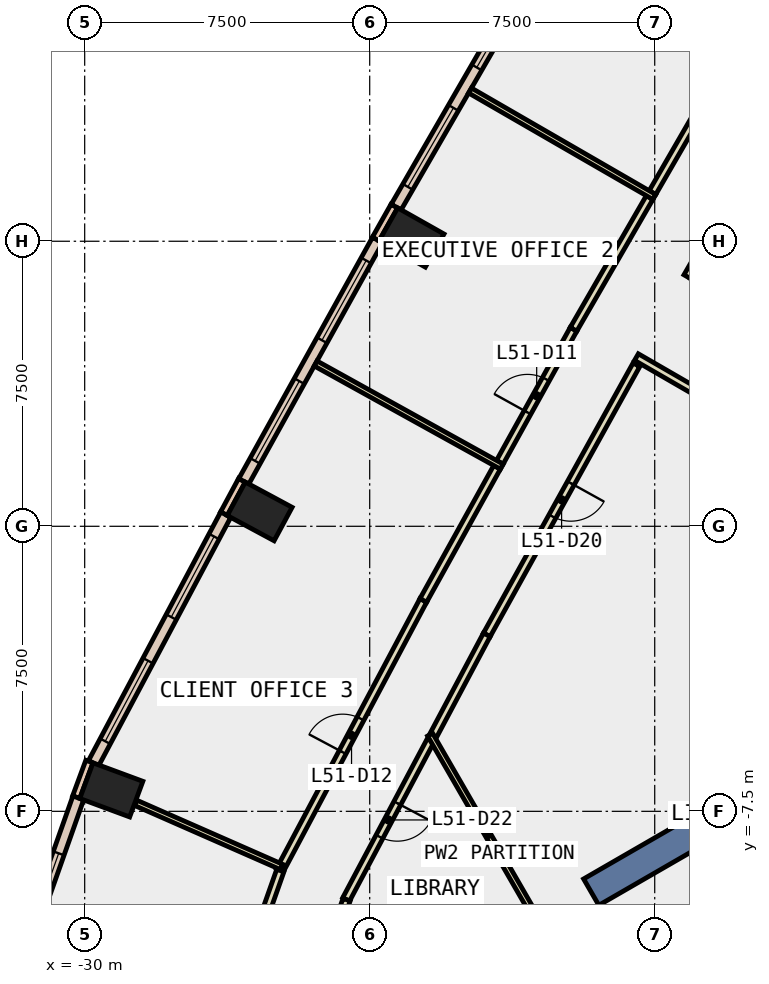
"""IFC4 building model, lengths in metres.
Left out: names, types, materials, properties, quantities, classifications, styles, units other than length and angle.
Written with IfcOpenShell. Run it as: python <this file> out.ifc"""

import sys

from ifc_helpers import new_model, si_unit, direction, frame, frame_2d, origin, origin_2d, place, context, subcontext, project, spatial, rectangle, extrude, element, fill, save


model = new_model("IFC4")
c1 = context("Model", 3, precision=1e-05, world=origin(), true_north=direction((0.0, 1.0)))
c2 = subcontext(c1, "Body", "Model", "MODEL_VIEW")
j1 = project(units=[si_unit("LENGTHUNIT", "METRE"), si_unit("PLANEANGLEUNIT", "RADIAN")], contexts=[c1])
p1 = place(None, origin())
s1 = spatial("IfcSite", under=j1, at=p1, CompositionType="ELEMENT")
p2 = place(p1, origin())
s2 = spatial("IfcBuilding", under=s1, at=p2, CompositionType="ELEMENT")
p3 = place(p2, frame((0.0, 0.0, 227.6)))
s3 = spatial("IfcBuildingStorey", under=s2, at=p3, CompositionType="ELEMENT", Elevation=227.6)
for number, where, z_axis, x_axis in (
    (1, (-21.4, 7.599, -0.4), (0.0, 0.0, 1.0), (0.491, 0.871, 0.0)),
    (2, (-25.395, 0.391, -0.4), (0.0, 0.0, 1.0), (0.474, 0.88, 0.0)),
    (3, (-29.299, -6.936, -0.4), (0.0, 0.0, 1.0), (0.347, 0.938, 0.0)),
):
    element("IfcColumn", number, at=place(p3, frame(where, z_axis=z_axis, x_axis=x_axis)), inside=s3, PredefinedType="COLUMN", context=c2, shape_type="SweptSolid", body=[
        extrude(rectangle(XDim=1.0, YDim=1.4, at=origin_2d()), origin(), (0.0, 0.0, 1.0), 4.2),
    ])
p4 = place(p3, frame((-8.877, -5.125, -0.4), z_axis=(0.0, 0.0, 1.0), x_axis=(-0.866017533419, -0.500013631625, 0.0)))
e4 = element("IfcWall", 4, at=p4, inside=s3, PredefinedType="SHEAR", context=c2, shape_type="SweptSolid", body=[
    extrude(rectangle(XDim=9.0, YDim=0.8, at=frame_2d((4.5, 0.0))), origin(), (0.0, 0.0, 1.0), 4.2),
])
p5 = place(p3, frame((-21.851, 8.427, 0.0), z_axis=(0.0, 0.0, 1.0), x_axis=(-0.491743606947, -0.87074004446, 0.0)))
e5 = element("IfcWall", 5, at=p5, inside=s3, PredefinedType="STANDARD", context=c2, shape_type="SweptSolid", body=[
    extrude(rectangle(XDim=1.0, YDim=0.2, at=frame_2d((0.5, 0.0))), origin(), (0.0, 0.0, 1.0), 3.8),
])
p6 = place(p3, frame((-25.862, 1.211, 0.0), z_axis=(0.0, 0.0, 1.0), x_axis=(-0.473765014438, -0.880651299377, 0.0)))
e6 = element("IfcWall", 6, at=p6, inside=s3, PredefinedType="STANDARD", context=c2, shape_type="SweptSolid", body=[
    extrude(rectangle(XDim=1.0, YDim=0.2, at=frame_2d((0.5, 0.0))), origin(), (0.0, 0.0, 1.0), 3.8),
])
p7 = place(p3, frame((-29.876, -6.19, 0.0), z_axis=(0.0, 0.0, 1.0), x_axis=(-0.346892928577, -0.937904737222, 0.0)))
e7 = element("IfcWall", 7, at=p7, inside=s3, PredefinedType="STANDARD", context=c2, shape_type="SweptSolid", body=[
    extrude(rectangle(XDim=1.0, YDim=0.2, at=frame_2d((0.5, 0.0))), origin(), (0.0, 0.0, 1.0), 3.8),
])
p8 = place(p3, frame((-18.175, 14.683, 0.0), z_axis=(0.0, 0.0, 1.0), x_axis=(-0.500075798504, -0.865981637075, 0.0)))
e8 = element("IfcWall", 8, at=p8, inside=s3, PredefinedType="STANDARD", context=c2, shape_type="SweptSolid", body=[
    extrude(rectangle(XDim=7.257, YDim=0.3, at=frame_2d((3.628, 0.0))), origin(), (0.0, 0.0, 1.0), 3.8),
])
p9 = place(p8, frame((0.614, 0.0, 0.9)))
e9 = element("IfcOpeningElement", 9, at=p9, cuts=e8, PredefinedType="OPENING", context=c2, shape_type="SweptSolid", body=[
    extrude(rectangle(XDim=2.4, YDim=2.6, at=frame_2d((1.2, 1.3))), frame((0.0, 0.16, 0.0), z_axis=(0.0, -1.0, 0.0), x_axis=(1.0, 0.0, 0.0)), (0.0, 0.0, 1.0), 0.32),
])
p10 = place(p8, frame((4.242, 0.0, 0.9)))
e10 = element("IfcOpeningElement", 10, at=p10, cuts=e8, PredefinedType="OPENING", context=c2, shape_type="SweptSolid", body=[
    extrude(rectangle(XDim=2.4, YDim=2.6, at=frame_2d((1.2, 1.3))), frame((0.0, 0.16, 0.0), z_axis=(0.0, -1.0, 0.0), x_axis=(1.0, 0.0, 0.0)), (0.0, 0.0, 1.0), 0.32),
])
p11 = place(p3, frame((-22.295, 7.531, 0.0), z_axis=(0.0, 0.0, 1.0), x_axis=(-0.484742980126, -0.874656643043, 0.0)))
e11 = element("IfcWall", 11, at=p11, inside=s3, PredefinedType="STANDARD", context=c2, shape_type="SweptSolid", body=[
    extrude(rectangle(XDim=7.258, YDim=0.3, at=frame_2d((3.629, 0.0))), origin(), (0.0, 0.0, 1.0), 3.8),
])
p12 = place(p11, frame((0.614, 0.0, 0.9)))
e12 = element("IfcOpeningElement", 12, at=p12, cuts=e11, PredefinedType="OPENING", context=c2, shape_type="SweptSolid", body=[
    extrude(rectangle(XDim=2.4, YDim=2.6, at=frame_2d((1.2, 1.3))), frame((0.0, 0.16, 0.0), z_axis=(0.0, -1.0, 0.0), x_axis=(1.0, 0.0, 0.0)), (0.0, 0.0, 1.0), 0.32),
])
p13 = place(p11, frame((4.243, 0.0, 0.9)))
e13 = element("IfcOpeningElement", 13, at=p13, cuts=e11, PredefinedType="OPENING", context=c2, shape_type="SweptSolid", body=[
    extrude(rectangle(XDim=2.4, YDim=2.6, at=frame_2d((1.2, 1.3))), frame((0.0, 0.16, 0.0), z_axis=(0.0, -1.0, 0.0), x_axis=(1.0, 0.0, 0.0)), (0.0, 0.0, 1.0), 0.32),
])
p14 = place(p3, frame((-26.289, 0.306, 0.0), z_axis=(0.0, 0.0, 1.0), x_axis=(-0.469429229062, -0.882970100797, 0.0)))
e14 = element("IfcWall", 14, at=p14, inside=s3, PredefinedType="STANDARD", context=c2, shape_type="SweptSolid", body=[
    extrude(rectangle(XDim=7.404, YDim=0.3, at=frame_2d((3.702, 0.0))), origin(), (0.0, 0.0, 1.0), 3.8),
])
p15 = place(p14, frame((0.651, 0.0, 0.9)))
e15 = element("IfcOpeningElement", 15, at=p15, cuts=e14, PredefinedType="OPENING", context=c2, shape_type="SweptSolid", body=[
    extrude(rectangle(XDim=2.4, YDim=2.6, at=frame_2d((1.2, 1.3))), frame((0.0, 0.16, 0.0), z_axis=(0.0, -1.0, 0.0), x_axis=(1.0, 0.0, 0.0)), (0.0, 0.0, 1.0), 0.32),
])
p16 = place(p14, frame((4.353, 0.0, 0.9)))
e16 = element("IfcOpeningElement", 16, at=p16, cuts=e14, PredefinedType="OPENING", context=c2, shape_type="SweptSolid", body=[
    extrude(rectangle(XDim=2.4, YDim=2.6, at=frame_2d((1.2, 1.3))), frame((0.0, 0.16, 0.0), z_axis=(0.0, -1.0, 0.0), x_axis=(1.0, 0.0, 0.0)), (0.0, 0.0, 1.0), 0.32),
])
p17 = place(p3, frame((-30.169, -7.147, 0.0), z_axis=(0.0, 0.0, 1.0), x_axis=(-0.333280640478, -0.942827669663, 0.0)))
e17 = element("IfcWall", 17, at=p17, inside=s3, PredefinedType="STANDARD", context=c2, shape_type="SweptSolid", body=[
    extrude(rectangle(XDim=4.492, YDim=0.3, at=frame_2d((2.246, 0.0))), origin(), (0.0, 0.0, 1.0), 3.8),
])
p18 = place(p17, frame((1.546, 0.0, 0.9)))
e18 = element("IfcOpeningElement", 18, at=p18, cuts=e17, PredefinedType="OPENING", context=c2, shape_type="SweptSolid", body=[
    extrude(rectangle(XDim=1.4, YDim=2.6, at=frame_2d((0.7, 1.3))), frame((0.0, 0.16, 0.0), z_axis=(0.0, -1.0, 0.0), x_axis=(1.0, 0.0, 0.0)), (0.0, 0.0, 1.0), 0.32),
])
p19 = place(p3, frame((-11.42, 11.283, 0.0), z_axis=(0.0, 0.0, 1.0), x_axis=(-0.500179011873, -0.86592202656, 0.0)))
e19 = element("IfcWall", 19, at=p19, inside=s3, PredefinedType="PARTITIONING", context=c2, shape_type="SweptSolid", body=[
    extrude(rectangle(XDim=5.446, YDim=0.2, at=frame_2d((2.723, 0.0))), origin(), (0.0, 0.0, 1.0), 3.8),
])
p20 = place(p19, frame((2.223, 0.0, 0.0)))
e20 = element("IfcOpeningElement", 20, at=p20, cuts=e19, PredefinedType="OPENING", context=c2, shape_type="SweptSolid", body=[
    extrude(rectangle(XDim=1.0, YDim=2.1, at=frame_2d((0.5, 1.05))), frame((0.0, 0.11, 0.0), z_axis=(0.0, -1.0, 0.0), x_axis=(1.0, 0.0, 0.0)), (0.0, 0.0, 1.0), 0.22),
])
p21 = place(p3, frame((-15.482, 4.249, 0.0), z_axis=(0.0, 0.0, 1.0), x_axis=(-0.484683114876, -0.874689818252, 0.0)))
e21 = element("IfcWall", 21, at=p21, inside=s3, PredefinedType="PARTITIONING", context=c2, shape_type="SweptSolid", body=[
    extrude(rectangle(XDim=8.123, YDim=0.2, at=frame_2d((4.062, 0.0))), origin(), (0.0, 0.0, 1.0), 3.8),
])
p22 = place(p21, frame((3.561, 0.0, 0.0)))
e22 = element("IfcOpeningElement", 22, at=p22, cuts=e21, PredefinedType="OPENING", context=c2, shape_type="SweptSolid", body=[
    extrude(rectangle(XDim=1.0, YDim=2.1, at=frame_2d((0.5, 1.05))), frame((0.0, 0.11, 0.0), z_axis=(0.0, -1.0, 0.0), x_axis=(1.0, 0.0, 0.0)), (0.0, 0.0, 1.0), 0.22),
])
p23 = place(p3, frame((-19.419, -2.856, 0.0), z_axis=(0.0, 0.0, 1.0), x_axis=(-0.469627838973, -0.882864481595, 0.0)))
e23 = element("IfcWall", 23, at=p23, inside=s3, PredefinedType="PARTITIONING", context=c2, shape_type="SweptSolid", body=[
    extrude(rectangle(XDim=2.996, YDim=0.2, at=frame_2d((1.498, 0.0))), origin(), (0.0, 0.0, 1.0), 3.8),
])
p24 = place(p3, frame((-20.896, -5.634, 0.0), z_axis=(0.0, 0.0, 1.0), x_axis=(-0.469448951755, -0.882959614986, 0.0)))
e24 = element("IfcWall", 24, at=p24, inside=s3, PredefinedType="PARTITIONING", context=c2, shape_type="SweptSolid", body=[
    extrude(rectangle(XDim=4.74, YDim=0.2, at=frame_2d((2.37, 0.0))), origin(), (0.0, 0.0, 1.0), 3.8),
])
p25 = place(p24, frame((1.87, 0.0, 0.0)))
e25 = element("IfcOpeningElement", 25, at=p25, cuts=e24, PredefinedType="OPENING", context=c2, shape_type="SweptSolid", body=[
    extrude(rectangle(XDim=1.0, YDim=2.1, at=frame_2d((0.5, 1.05))), frame((0.0, 0.11, 0.0), z_axis=(0.0, -1.0, 0.0), x_axis=(1.0, 0.0, 0.0)), (0.0, 0.0, 1.0), 0.22),
])
p26 = place(p3, frame((-23.108, -9.825, 0.0), z_axis=(0.0, 0.0, 1.0), x_axis=(-0.333166995935, -0.942867834227, 0.0)))
e26 = element("IfcWall", 26, at=p26, inside=s3, PredefinedType="PARTITIONING", context=c2, shape_type="SweptSolid", body=[
    extrude(rectangle(XDim=2.798, YDim=0.2, at=frame_2d((1.399, 0.0))), origin(), (0.0, 0.0, 1.0), 3.8),
])
p27 = place(p3, frame((-15.059, 8.78, 0.0), z_axis=(0.0, 0.0, 1.0), x_axis=(0.500093699572, 0.865971299552, 0.0)))
e27 = element("IfcWall", 27, at=p27, inside=s3, PredefinedType="PARTITIONING", context=c2, shape_type="SweptSolid", body=[
    extrude(rectangle(XDim=4.004, YDim=0.2, at=frame_2d((2.002, 0.0))), origin(), (0.0, 0.0, 1.0), 3.8),
])
p28 = place(p3, frame((-19.076, 1.684, 0.0), z_axis=(0.0, 0.0, 1.0), x_axis=(0.484679349661, 0.874691904623, 0.0)))
e28 = element("IfcWall", 28, at=p28, inside=s3, PredefinedType="PARTITIONING", context=c2, shape_type="SweptSolid", body=[
    extrude(rectangle(XDim=4.002, YDim=0.2, at=frame_2d((2.001, 0.0))), origin(), (0.0, 0.0, 1.0), 3.8),
])
p29 = place(p28, frame((1.501, 0.0, 0.0)))
e29 = element("IfcOpeningElement", 29, at=p29, cuts=e28, PredefinedType="OPENING", context=c2, shape_type="SweptSolid", body=[
    extrude(rectangle(XDim=1.0, YDim=2.1, at=frame_2d((0.5, 1.05))), frame((0.0, 0.11, 0.0), z_axis=(0.0, -1.0, 0.0), x_axis=(1.0, 0.0, 0.0)), (0.0, 0.0, 1.0), 0.22),
])
p30 = place(p3, frame((-17.136, 5.185, 0.0), z_axis=(0.0, 0.0, 1.0), x_axis=(0.500102734445, 0.865966081899, 0.0)))
e30 = element("IfcWall", 30, at=p30, inside=s3, PredefinedType="PARTITIONING", context=c2, shape_type="SweptSolid", body=[
    extrude(rectangle(XDim=4.001, YDim=0.2, at=frame_2d((2.0, 0.0))), origin(), (0.0, 0.0, 1.0), 3.8),
])
p31 = place(p3, frame((-24.866, -9.053, 0.0), z_axis=(0.0, 0.0, 1.0), x_axis=(0.469431794586, 0.882968736837, 0.0)))
e31 = element("IfcWall", 31, at=p31, inside=s3, PredefinedType="PARTITIONING", context=c2, shape_type="SweptSolid", body=[
    extrude(rectangle(XDim=8.046, YDim=0.2, at=frame_2d((4.023, 0.0))), origin(), (0.0, 0.0, 1.0), 3.8),
])
p32 = place(p31, frame((3.522, 0.0, 0.0)))
e32 = element("IfcOpeningElement", 32, at=p32, cuts=e31, PredefinedType="OPENING", context=c2, shape_type="SweptSolid", body=[
    extrude(rectangle(XDim=1.0, YDim=2.1, at=frame_2d((0.5, 1.05))), frame((0.0, 0.11, 0.0), z_axis=(0.0, -1.0, 0.0), x_axis=(1.0, 0.0, 0.0)), (0.0, 0.0, 1.0), 0.22),
])
p33 = place(p3, frame((-21.089, -1.949, 0.0), z_axis=(0.0, 0.0, 1.0), x_axis=(0.484622593188, 0.874723351793, 0.0)))
e33 = element("IfcWall", 33, at=p33, inside=s3, PredefinedType="PARTITIONING", context=c2, shape_type="SweptSolid", body=[
    extrude(rectangle(XDim=4.003, YDim=0.2, at=frame_2d((2.002, 0.0))), origin(), (0.0, 0.0, 1.0), 3.8),
])
p34 = place(p3, frame((-26.013, -12.345, 0.0), z_axis=(0.0, 0.0, 1.0), x_axis=(0.333116923704, 0.942885526001, 0.0)))
e34 = element("IfcWall", 34, at=p34, inside=s3, PredefinedType="PARTITIONING", context=c2, shape_type="SweptSolid", body=[
    extrude(rectangle(XDim=3.485, YDim=0.2, at=frame_2d((1.742, 0.0))), origin(), (0.0, 0.0, 1.0), 3.8),
])
p35 = place(p3, frame((-17.87, -10.749, 0.0), z_axis=(0.0, 0.0, 1.0), x_axis=(-0.499907758807, 0.866078652713, 0.0)))
e35 = element("IfcWall", 35, at=p35, inside=s3, PredefinedType="PARTITIONING", context=c2, shape_type="SweptSolid", body=[
    extrude(rectangle(XDim=6.083, YDim=0.15, at=frame_2d((3.042, 0.0))), origin(), (0.0, 0.0, 1.0), 3.8),
])
p36 = place(p3, frame((-15.01, 8.665, 0.0), z_axis=(0.0, 0.0, 1.0), x_axis=(-0.865961984968, 0.500109828528, 0.0)))
e36 = element("IfcWall", 36, at=p36, inside=s3, PredefinedType="PARTITIONING", context=c2, shape_type="SweptSolid", body=[
    extrude(rectangle(XDim=5.601, YDim=0.15, at=frame_2d((2.8, 0.0))), origin(), (0.0, 0.0, 1.0), 3.8),
])
p37 = place(p3, frame((-19.025, 1.57, 0.0), z_axis=(0.0, 0.0, 1.0), x_axis=(-0.874714019242, 0.484639437666, 0.0)))
e37 = element("IfcWall", 37, at=p37, inside=s3, PredefinedType="PARTITIONING", context=c2, shape_type="SweptSolid", body=[
    extrude(rectangle(XDim=5.6, YDim=0.15, at=frame_2d((2.8, 0.0))), origin(), (0.0, 0.0, 1.0), 3.8),
])
p38 = place(p3, frame((-24.819, -8.964, 0.0), z_axis=(0.0, 0.0, 1.0), x_axis=(-0.915460951187, 0.402406817602, 0.0)))
e38 = element("IfcWall", 38, at=p38, inside=s3, PredefinedType="PARTITIONING", context=c2, shape_type="SweptSolid", body=[
    extrude(rectangle(XDim=4.192, YDim=0.15, at=frame_2d((2.096, 0.0))), origin(), (0.0, 0.0, 1.0), 3.8),
])
p39 = place(p3, frame((-13.59, 3.36, 0.0), z_axis=(0.0, 0.0, 1.0), x_axis=(-0.866004963011, 0.500035402787, 0.0)))
e39 = element("IfcWall", 39, at=p39, inside=s3, PredefinedType="PARTITIONING", context=c2, shape_type="SweptSolid", body=[
    extrude(rectangle(XDim=2.183, YDim=0.2, at=frame_2d((1.092, 0.0))), origin(), (0.0, 0.0, 1.0), 3.8),
])
p40 = place(p9, origin())
e40 = element("IfcWindow", 40, at=p40, inside=s3, PartitioningType="SINGLE_PANEL", PredefinedType="WINDOW", context=c2, shape_type="SweptSolid", body=[
    extrude(rectangle(XDim=2.4, YDim=2.6, at=frame_2d((1.2, 1.3))), frame((0.0, 0.03, 0.0), z_axis=(0.0, -1.0, 0.0), x_axis=(1.0, 0.0, 0.0)), (0.0, 0.0, 1.0), 0.06),
])
fill(e9, e40)
p41 = place(p10, origin())
e41 = element("IfcWindow", 41, at=p41, inside=s3, PartitioningType="SINGLE_PANEL", PredefinedType="WINDOW", context=c2, shape_type="SweptSolid", body=[
    extrude(rectangle(XDim=2.4, YDim=2.6, at=frame_2d((1.2, 1.3))), frame((0.0, 0.03, 0.0), z_axis=(0.0, -1.0, 0.0), x_axis=(1.0, 0.0, 0.0)), (0.0, 0.0, 1.0), 0.06),
])
fill(e10, e41)
p42 = place(p12, origin())
e42 = element("IfcWindow", 42, at=p42, inside=s3, PartitioningType="SINGLE_PANEL", PredefinedType="WINDOW", context=c2, shape_type="SweptSolid", body=[
    extrude(rectangle(XDim=2.4, YDim=2.6, at=frame_2d((1.2, 1.3))), frame((0.0, 0.03, 0.0), z_axis=(0.0, -1.0, 0.0), x_axis=(1.0, 0.0, 0.0)), (0.0, 0.0, 1.0), 0.06),
])
fill(e12, e42)
p43 = place(p13, origin())
e43 = element("IfcWindow", 43, at=p43, inside=s3, PartitioningType="SINGLE_PANEL", PredefinedType="WINDOW", context=c2, shape_type="SweptSolid", body=[
    extrude(rectangle(XDim=2.4, YDim=2.6, at=frame_2d((1.2, 1.3))), frame((0.0, 0.03, 0.0), z_axis=(0.0, -1.0, 0.0), x_axis=(1.0, 0.0, 0.0)), (0.0, 0.0, 1.0), 0.06),
])
fill(e13, e43)
p44 = place(p15, origin())
e44 = element("IfcWindow", 44, at=p44, inside=s3, PartitioningType="SINGLE_PANEL", PredefinedType="WINDOW", context=c2, shape_type="SweptSolid", body=[
    extrude(rectangle(XDim=2.4, YDim=2.6, at=frame_2d((1.2, 1.3))), frame((0.0, 0.03, 0.0), z_axis=(0.0, -1.0, 0.0), x_axis=(1.0, 0.0, 0.0)), (0.0, 0.0, 1.0), 0.06),
])
fill(e15, e44)
p45 = place(p16, origin())
e45 = element("IfcWindow", 45, at=p45, inside=s3, PartitioningType="SINGLE_PANEL", PredefinedType="WINDOW", context=c2, shape_type="SweptSolid", body=[
    extrude(rectangle(XDim=2.4, YDim=2.6, at=frame_2d((1.2, 1.3))), frame((0.0, 0.03, 0.0), z_axis=(0.0, -1.0, 0.0), x_axis=(1.0, 0.0, 0.0)), (0.0, 0.0, 1.0), 0.06),
])
fill(e16, e45)
p46 = place(p18, origin())
e46 = element("IfcWindow", 46, at=p46, inside=s3, PartitioningType="SINGLE_PANEL", PredefinedType="WINDOW", context=c2, shape_type="SweptSolid", body=[
    extrude(rectangle(XDim=1.4, YDim=2.6, at=frame_2d((0.7, 1.3))), frame((0.0, 0.03, 0.0), z_axis=(0.0, -1.0, 0.0), x_axis=(1.0, 0.0, 0.0)), (0.0, 0.0, 1.0), 0.06),
])
fill(e18, e46)
p47 = place(p29, origin())
e47 = element("IfcDoor", 47, at=p47, inside=s3, OperationType="SINGLE_SWING_LEFT", PredefinedType="DOOR", context=c2, shape_type="SweptSolid", body=[
    extrude(rectangle(XDim=1.0, YDim=2.1, at=frame_2d((0.5, 1.05))), frame((0.0, 0.025, 0.0), z_axis=(0.0, -1.0, 0.0), x_axis=(1.0, 0.0, 0.0)), (0.0, 0.0, 1.0), 0.05),
])
fill(e29, e47)
p48 = place(p32, origin())
e48 = element("IfcDoor", 48, at=p48, inside=s3, OperationType="SINGLE_SWING_LEFT", PredefinedType="DOOR", context=c2, shape_type="SweptSolid", body=[
    extrude(rectangle(XDim=1.0, YDim=2.1, at=frame_2d((0.5, 1.05))), frame((0.0, 0.025, 0.0), z_axis=(0.0, -1.0, 0.0), x_axis=(1.0, 0.0, 0.0)), (0.0, 0.0, 1.0), 0.05),
])
fill(e32, e48)
p49 = place(p22, origin())
e49 = element("IfcDoor", 49, at=p49, inside=s3, OperationType="SINGLE_SWING_LEFT", PredefinedType="DOOR", context=c2, shape_type="SweptSolid", body=[
    extrude(rectangle(XDim=1.0, YDim=2.1, at=frame_2d((0.5, 1.05))), frame((0.0, 0.025, 0.0), z_axis=(0.0, -1.0, 0.0), x_axis=(1.0, 0.0, 0.0)), (0.0, 0.0, 1.0), 0.05),
])
fill(e22, e49)
p50 = place(p25, origin())
e50 = element("IfcDoor", 50, at=p50, inside=s3, OperationType="SINGLE_SWING_LEFT", PredefinedType="DOOR", context=c2, shape_type="SweptSolid", body=[
    extrude(rectangle(XDim=1.0, YDim=2.1, at=frame_2d((0.5, 1.05))), frame((0.0, 0.025, 0.0), z_axis=(0.0, -1.0, 0.0), x_axis=(1.0, 0.0, 0.0)), (0.0, 0.0, 1.0), 0.05),
])
fill(e25, e50)
save(model, sys.argv[1])
